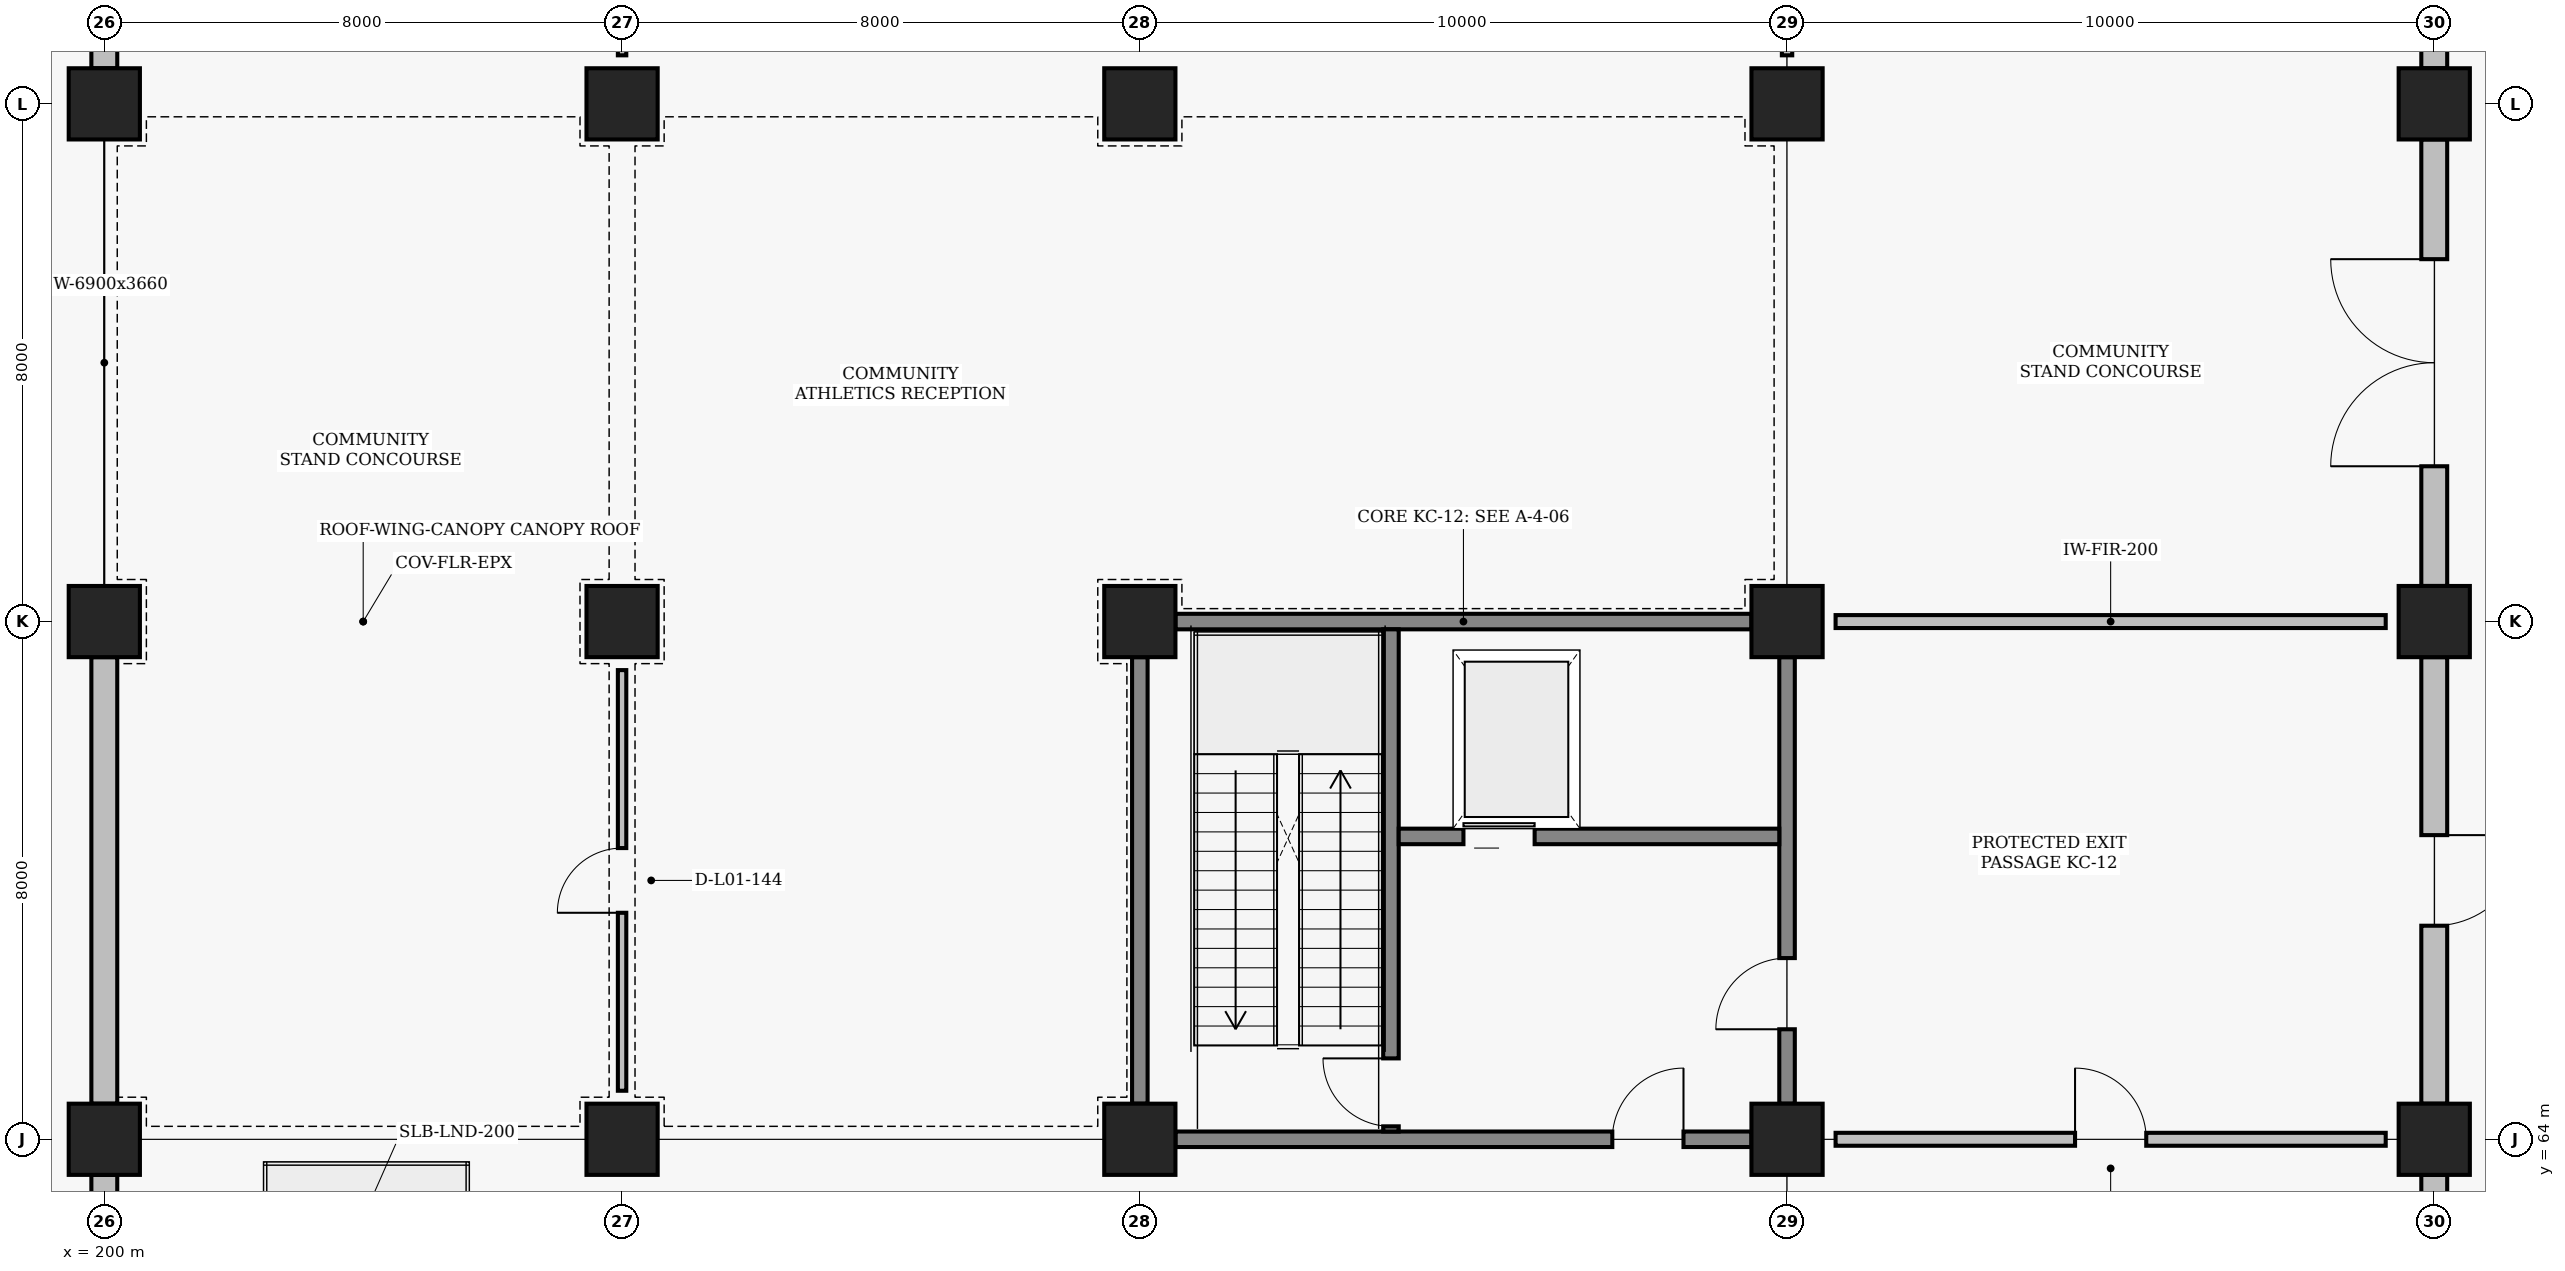
"""IFC4 building model, lengths in metres.
Left out: names, types, materials, properties, quantities, classifications, styles, units other than length and angle.
Written with IfcOpenShell. Run it as: python <this file> out.ifc"""

import sys

from ifc_helpers import new_model, si_unit, direction, frame, frame_2d, origin, origin_2d, place, context, subcontext, project, spatial, rectangle, extrude, element, fill, save


model = new_model("IFC4")
c1 = context("Model", 3, precision=1e-05, world=origin(), true_north=direction((0.0, 1.0)))
c2 = subcontext(c1, "Body", "Model", "MODEL_VIEW")
j1 = project(units=[si_unit("LENGTHUNIT", "METRE"), si_unit("PLANEANGLEUNIT", "RADIAN")], contexts=[c1])
p1 = place(None, origin())
s1 = spatial("IfcSite", under=j1, at=p1, CompositionType="ELEMENT")
p2 = place(p1, origin())
s2 = spatial("IfcBuilding", under=s1, at=p2, CompositionType="ELEMENT")
p3 = place(p2, origin())
s3 = spatial("IfcBuildingStorey", under=s2, at=p3, CompositionType="ELEMENT", Elevation=0.0)
for number, where, z_axis, x_axis in (
    (1, (200.0, 64.0, 0.0), (0.0, 0.0, 1.0), (1.0, 0.0, 0.0)),
    (2, (200.0, 72.0, 0.0), (0.0, 0.0, 1.0), (1.0, 0.0, 0.0)),
    (3, (200.0, 80.0, 0.0), (0.0, 0.0, 1.0), (1.0, 0.0, 0.0)),
    (4, (208.0, 64.0, 0.0), (0.0, 0.0, 1.0), (1.0, 0.0, 0.0)),
    (5, (208.0, 72.0, 0.0), (0.0, 0.0, 1.0), (1.0, 0.0, 0.0)),
    (6, (208.0, 80.0, 0.0), (0.0, 0.0, 1.0), (1.0, 0.0, 0.0)),
    (7, (216.0, 64.0, 0.0), (0.0, 0.0, 1.0), (1.0, 0.0, 0.0)),
    (8, (216.0, 72.0, 0.0), (0.0, 0.0, 1.0), (1.0, 0.0, 0.0)),
    (9, (216.0, 80.0, 0.0), (0.0, 0.0, 1.0), (1.0, 0.0, 0.0)),
    (10, (226.0, 64.0, 0.0), (0.0, 0.0, 1.0), (1.0, 0.0, 0.0)),
    (11, (226.0, 72.0, 0.0), (0.0, 0.0, 1.0), (1.0, 0.0, 0.0)),
    (12, (226.0, 80.0, 0.0), (0.0, 0.0, 1.0), (1.0, 0.0, 0.0)),
    (13, (236.0, 64.0, 0.0), (0.0, 0.0, 1.0), (1.0, 0.0, 0.0)),
    (14, (236.0, 72.0, 0.0), (0.0, 0.0, 1.0), (1.0, 0.0, 0.0)),
    (15, (236.0, 80.0, 0.0), (0.0, 0.0, 1.0), (1.0, 0.0, 0.0)),
):
    element("IfcColumn", number, at=place(p3, frame(where, z_axis=z_axis, x_axis=x_axis)), inside=s3, PredefinedType="COLUMN", context=c2, shape_type="SweptSolid", body=[
        extrude(rectangle(XDim=1.1, YDim=1.1, at=origin_2d()), origin(), (0.0, 0.0, 1.0), 4.8),
    ])
p4 = place(p3, frame((200.0, 56.55, 0.0), z_axis=(0.0, 0.0, 1.0), x_axis=(0.0, 1.0, 0.0)))
e16 = element("IfcWall", 16, at=p4, inside=s3, PredefinedType="SOLIDWALL", context=c2, shape_type="SweptSolid", body=[
    extrude(rectangle(XDim=6.9, YDim=0.4, at=frame_2d((3.45, 0.0))), origin(), (0.0, 0.0, 1.0), 3.91),
])
p5 = place(p4, frame((2.85, 0.0, 0.95)))
e17 = element("IfcOpeningElement", 17, at=p5, cuts=e16, PredefinedType="OPENING", context=c2, shape_type="SweptSolid", body=[
    extrude(rectangle(XDim=1.2, YDim=1.5, at=frame_2d((0.6, 0.75))), frame((0.0, 0.21, 0.0), z_axis=(0.0, -1.0, 0.0), x_axis=(1.0, 0.0, 0.0)), (0.0, 0.0, 1.0), 0.42),
])
p6 = place(p3, frame((200.0, 64.55, 0.0), z_axis=(0.0, 0.0, 1.0), x_axis=(0.0, 1.0, 0.0)))
e18 = element("IfcWall", 18, at=p6, inside=s3, PredefinedType="SOLIDWALL", context=c2, shape_type="SweptSolid", body=[
    extrude(rectangle(XDim=6.9, YDim=0.4, at=frame_2d((3.45, 0.0))), origin(), (0.0, 0.0, 1.0), 3.91),
])
p7 = place(p3, frame((200.0, 80.55, 0.0), z_axis=(0.0, 0.0, 1.0), x_axis=(0.0, 1.0, 0.0)))
e19 = element("IfcWall", 19, at=p7, inside=s3, PredefinedType="SOLIDWALL", context=c2, shape_type="SweptSolid", body=[
    extrude(rectangle(XDim=6.9, YDim=0.4, at=frame_2d((3.45, 0.0))), origin(), (0.0, 0.0, 1.0), 3.66),
])
p8 = place(p3, frame((236.0, 56.55, 0.0), z_axis=(0.0, 0.0, 1.0), x_axis=(0.0, 1.0, 0.0)))
e20 = element("IfcWall", 20, at=p8, inside=s3, PredefinedType="SOLIDWALL", context=c2, shape_type="SweptSolid", body=[
    extrude(rectangle(XDim=6.9, YDim=0.4, at=frame_2d((3.45, 0.0))), origin(), (0.0, 0.0, 1.0), 3.81),
])
p9 = place(p3, frame((236.0, 71.45, 0.0), z_axis=(0.0, 0.0, 1.0), x_axis=(0.0, -1.0, 0.0)))
e21 = element("IfcWall", 21, at=p9, inside=s3, PredefinedType="SOLIDWALL", context=c2, shape_type="SweptSolid", body=[
    extrude(rectangle(XDim=6.9, YDim=0.4, at=frame_2d((3.45, 0.0))), origin(), (0.0, 0.0, 1.0), 3.81),
])
p10 = place(p9, frame((2.75, 0.0, 0.0)))
e22 = element("IfcOpeningElement", 22, at=p10, cuts=e21, PredefinedType="OPENING", context=c2, shape_type="SweptSolid", body=[
    extrude(rectangle(XDim=1.4, YDim=2.2, at=frame_2d((0.7, 1.1))), frame((0.0, 0.21, 0.0), z_axis=(0.0, -1.0, 0.0), x_axis=(1.0, 0.0, 0.0)), (0.0, 0.0, 1.0), 0.42),
])
p11 = place(p3, frame((236.0, 72.55, 0.0), z_axis=(0.0, 0.0, 1.0), x_axis=(0.0, 1.0, 0.0)))
e23 = element("IfcWall", 23, at=p11, inside=s3, PredefinedType="SOLIDWALL", context=c2, shape_type="SweptSolid", body=[
    extrude(rectangle(XDim=6.9, YDim=0.4, at=frame_2d((3.45, 0.0))), origin(), (0.0, 0.0, 1.0), 3.81),
])
p12 = place(p11, frame((1.85, 0.0, 0.0)))
e24 = element("IfcOpeningElement", 24, at=p12, cuts=e23, PredefinedType="OPENING", context=c2, shape_type="SweptSolid", body=[
    extrude(rectangle(XDim=3.2, YDim=2.7, at=frame_2d((1.6, 1.35))), frame((0.0, 0.21, 0.0), z_axis=(0.0, -1.0, 0.0), x_axis=(1.0, 0.0, 0.0)), (0.0, 0.0, 1.0), 0.42),
])
p13 = place(p3, frame((236.0, 80.55, 0.0), z_axis=(0.0, 0.0, 1.0), x_axis=(0.0, 1.0, 0.0)))
e25 = element("IfcWall", 25, at=p13, inside=s3, PredefinedType="SOLIDWALL", context=c2, shape_type="SweptSolid", body=[
    extrude(rectangle(XDim=6.9, YDim=0.4, at=frame_2d((3.45, 0.0))), origin(), (0.0, 0.0, 1.0), 3.81),
])
p14 = place(p13, frame((2.05, 0.0, 0.0)))
e26 = element("IfcOpeningElement", 26, at=p14, cuts=e25, PredefinedType="OPENING", context=c2, shape_type="SweptSolid", body=[
    extrude(rectangle(XDim=2.8, YDim=2.55, at=frame_2d((1.4, 1.275))), frame((0.0, 0.21, 0.0), z_axis=(0.0, -1.0, 0.0), x_axis=(1.0, 0.0, 0.0)), (0.0, 0.0, 1.0), 0.42),
])
p15 = place(p3, frame((216.55, 64.0, 0.0), z_axis=(0.0, 0.0, 1.0), x_axis=(1.0, 0.0, 0.0)))
e27 = element("IfcWall", 27, at=p15, inside=s3, PredefinedType="SHEAR", context=c2, shape_type="SweptSolid", body=[
    extrude(rectangle(XDim=8.9, YDim=0.24, at=frame_2d((4.45, 0.0))), origin(), (0.0, 0.0, 1.0), 3.81),
])
p16 = place(p15, frame((6.75, 0.0, 0.0)))
e28 = element("IfcOpeningElement", 28, at=p16, cuts=e27, PredefinedType="OPENING", context=c2, shape_type="SweptSolid", body=[
    extrude(rectangle(XDim=1.1, YDim=2.2, at=frame_2d((0.55, 1.1))), frame((0.0, 0.13, 0.0), z_axis=(0.0, -1.0, 0.0), x_axis=(1.0, 0.0, 0.0)), (0.0, 0.0, 1.0), 0.26),
])
p17 = place(p3, frame((216.55, 72.0, 0.0), z_axis=(0.0, 0.0, 1.0), x_axis=(1.0, 0.0, 0.0)))
e29 = element("IfcWall", 29, at=p17, inside=s3, PredefinedType="SHEAR", context=c2, shape_type="SweptSolid", body=[
    extrude(rectangle(XDim=8.9, YDim=0.24, at=frame_2d((4.45, 0.0))), origin(), (0.0, 0.0, 1.0), 3.66),
])
p18 = place(p3, frame((216.0, 64.55, 0.0), z_axis=(0.0, 0.0, 1.0), x_axis=(0.0, 1.0, 0.0)))
e30 = element("IfcWall", 30, at=p18, inside=s3, PredefinedType="SHEAR", context=c2, shape_type="SweptSolid", body=[
    extrude(rectangle(XDim=6.9, YDim=0.24, at=frame_2d((3.45, 0.0))), origin(), (0.0, 0.0, 1.0), 3.66),
])
p19 = place(p3, frame((226.0, 64.55, 0.0), z_axis=(0.0, 0.0, 1.0), x_axis=(0.0, 1.0, 0.0)))
e31 = element("IfcWall", 31, at=p19, inside=s3, PredefinedType="SHEAR", context=c2, shape_type="SweptSolid", body=[
    extrude(rectangle(XDim=6.9, YDim=0.24, at=frame_2d((3.45, 0.0))), origin(), (0.0, 0.0, 1.0), 3.81),
])
p20 = place(p19, frame((1.15, 0.0, 0.0)))
e32 = element("IfcOpeningElement", 32, at=p20, cuts=e31, PredefinedType="OPENING", context=c2, shape_type="SweptSolid", body=[
    extrude(rectangle(XDim=1.1, YDim=2.2, at=frame_2d((0.55, 1.1))), frame((0.0, 0.13, 0.0), z_axis=(0.0, -1.0, 0.0), x_axis=(1.0, 0.0, 0.0)), (0.0, 0.0, 1.0), 0.26),
])
p21 = place(p3, frame((219.88, 64.12, 0.0), z_axis=(0.0, 0.0, 1.0), x_axis=(0.0, 1.0, 0.0)))
e33 = element("IfcWall", 33, at=p21, inside=s3, PredefinedType="SHEAR", context=c2, shape_type="SweptSolid", body=[
    extrude(rectangle(XDim=7.76, YDim=0.24, at=frame_2d((3.88, 0.0))), origin(), (0.0, 0.0, 1.0), 4.01),
])
p22 = place(p21, frame((0.08, 0.0, 0.0)))
e34 = element("IfcOpeningElement", 34, at=p22, cuts=e33, PredefinedType="OPENING", context=c2, shape_type="SweptSolid", body=[
    extrude(rectangle(XDim=1.05, YDim=2.15, at=frame_2d((0.525, 1.075))), frame((0.0, 0.13, 0.0), z_axis=(0.0, -1.0, 0.0), x_axis=(1.0, 0.0, 0.0)), (0.0, 0.0, 1.0), 0.26),
])
p23 = place(p3, frame((220.0, 68.68, 0.0), z_axis=(0.0, 0.0, 1.0), x_axis=(1.0, 0.0, 0.0)))
e35 = element("IfcWall", 35, at=p23, inside=s3, PredefinedType="SHEAR", context=c2, shape_type="SweptSolid", body=[
    extrude(rectangle(XDim=5.88, YDim=0.24, at=frame_2d((2.94, 0.0))), origin(), (0.0, 0.0, 1.0), 3.81),
])
p24 = place(p23, frame((1.0, 0.0, 0.0)))
e36 = element("IfcOpeningElement", 36, at=p24, cuts=e35, PredefinedType="OPENING", context=c2, shape_type="SweptSolid", body=[
    extrude(rectangle(XDim=1.1, YDim=2.15, at=frame_2d((0.55, 1.075))), frame((0.0, 0.13, 0.0), z_axis=(0.0, -1.0, 0.0), x_axis=(1.0, 0.0, 0.0)), (0.0, 0.0, 1.0), 0.26),
])
p25 = place(p3, frame((226.75, 64.0, 0.0), z_axis=(0.0, 0.0, 1.0), x_axis=(1.0, 0.0, 0.0)))
e37 = element("IfcWall", 37, at=p25, inside=s3, PredefinedType="PARTITIONING", context=c2, shape_type="SweptSolid", body=[
    extrude(rectangle(XDim=8.5, YDim=0.2, at=frame_2d((4.25, 0.0))), origin(), (0.0, 0.0, 1.0), 3.81),
])
p26 = place(p25, frame((3.7, 0.0, 0.0)))
e38 = element("IfcOpeningElement", 38, at=p26, cuts=e37, PredefinedType="OPENING", context=c2, shape_type="SweptSolid", body=[
    extrude(rectangle(XDim=1.1, YDim=2.2, at=frame_2d((0.55, 1.1))), frame((0.0, 0.11, 0.0), z_axis=(0.0, -1.0, 0.0), x_axis=(1.0, 0.0, 0.0)), (0.0, 0.0, 1.0), 0.22),
])
p27 = place(p3, frame((226.75, 72.0, 0.0), z_axis=(0.0, 0.0, 1.0), x_axis=(1.0, 0.0, 0.0)))
e39 = element("IfcWall", 39, at=p27, inside=s3, PredefinedType="PARTITIONING", context=c2, shape_type="SweptSolid", body=[
    extrude(rectangle(XDim=8.5, YDim=0.2, at=frame_2d((4.25, 0.0))), origin(), (0.0, 0.0, 1.0), 3.81),
])
p28 = place(p3, frame((208.0, 80.75, 0.0), z_axis=(0.0, 0.0, 1.0), x_axis=(0.0, 1.0, 0.0)))
e40 = element("IfcWall", 40, at=p28, inside=s3, PredefinedType="PARTITIONING", context=c2, shape_type="SweptSolid", body=[
    extrude(rectangle(XDim=6.5, YDim=0.13, at=frame_2d((3.25, 0.0))), origin(), (0.0, 0.0, 1.0), 3.81),
])
p29 = place(p28, frame((2.75, 0.0, 0.0)))
e41 = element("IfcOpeningElement", 41, at=p29, cuts=e40, PredefinedType="OPENING", context=c2, shape_type="SweptSolid", body=[
    extrude(rectangle(XDim=1.0, YDim=2.1, at=frame_2d((0.5, 1.05))), frame((0.0, 0.075, 0.0), z_axis=(0.0, -1.0, 0.0), x_axis=(1.0, 0.0, 0.0)), (0.0, 0.0, 1.0), 0.15),
])
p30 = place(p3, frame((208.0, 64.75, 0.0), z_axis=(0.0, 0.0, 1.0), x_axis=(0.0, 1.0, 0.0)))
e42 = element("IfcWall", 42, at=p30, inside=s3, PredefinedType="PARTITIONING", context=c2, shape_type="SweptSolid", body=[
    extrude(rectangle(XDim=6.5, YDim=0.13, at=frame_2d((3.25, 0.0))), origin(), (0.0, 0.0, 1.0), 3.81),
])
p31 = place(p30, frame((2.75, 0.0, 0.0)))
e43 = element("IfcOpeningElement", 43, at=p31, cuts=e42, PredefinedType="OPENING", context=c2, shape_type="SweptSolid", body=[
    extrude(rectangle(XDim=1.0, YDim=2.1, at=frame_2d((0.5, 1.05))), frame((0.0, 0.075, 0.0), z_axis=(0.0, -1.0, 0.0), x_axis=(1.0, 0.0, 0.0)), (0.0, 0.0, 1.0), 0.15),
])
p32 = place(p3, frame((226.0, 80.75, 0.0), z_axis=(0.0, 0.0, 1.0), x_axis=(0.0, 1.0, 0.0)))
e44 = element("IfcWall", 44, at=p32, inside=s3, PredefinedType="PARTITIONING", context=c2, shape_type="SweptSolid", body=[
    extrude(rectangle(XDim=6.5, YDim=0.16, at=frame_2d((3.25, 0.0))), origin(), (0.0, 0.0, 1.0), 3.81),
])
p33 = place(p32, frame((2.75, 0.0, 0.0)))
e45 = element("IfcOpeningElement", 45, at=p33, cuts=e44, PredefinedType="OPENING", context=c2, shape_type="SweptSolid", body=[
    extrude(rectangle(XDim=1.0, YDim=2.1, at=frame_2d((0.5, 1.05))), frame((0.0, 0.09, 0.0), z_axis=(0.0, -1.0, 0.0), x_axis=(1.0, 0.0, 0.0)), (0.0, 0.0, 1.0), 0.18),
])
p34 = place(p10, origin())
e46 = element("IfcDoor", 46, at=p34, inside=s3, OperationType="SINGLE_SWING_LEFT", PredefinedType="DOOR", context=c2, shape_type="SweptSolid", body=[
    extrude(rectangle(XDim=1.4, YDim=2.2, at=frame_2d((0.7, 1.1))), frame((0.0, 0.025, 0.0), z_axis=(0.0, -1.0, 0.0), x_axis=(1.0, 0.0, 0.0)), (0.0, 0.0, 1.0), 0.05),
])
fill(e22, e46)
p35 = place(p12, origin())
e47 = element("IfcDoor", 47, at=p35, inside=s3, OperationType="DOUBLE_SWING_LEFT", PredefinedType="DOOR", context=c2, shape_type="SweptSolid", body=[
    extrude(rectangle(XDim=3.2, YDim=2.7, at=frame_2d((1.6, 1.35))), frame((0.0, 0.025, 0.0), z_axis=(0.0, -1.0, 0.0), x_axis=(1.0, 0.0, 0.0)), (0.0, 0.0, 1.0), 0.05),
])
fill(e24, e47)
p36 = place(p16, origin())
e48 = element("IfcDoor", 48, at=p36, inside=s3, OperationType="SINGLE_SWING_RIGHT", PredefinedType="DOOR", context=c2, shape_type="SweptSolid", body=[
    extrude(rectangle(XDim=1.1, YDim=2.2, at=frame_2d((0.55, 1.1))), frame((0.0, 0.025, 0.0), z_axis=(0.0, -1.0, 0.0), x_axis=(1.0, 0.0, 0.0)), (0.0, 0.0, 1.0), 0.05),
])
fill(e28, e48)
p37 = place(p20, origin())
e49 = element("IfcDoor", 49, at=p37, inside=s3, OperationType="SINGLE_SWING_LEFT", PredefinedType="DOOR", context=c2, shape_type="SweptSolid", body=[
    extrude(rectangle(XDim=1.1, YDim=2.2, at=frame_2d((0.55, 1.1))), frame((0.0, 0.025, 0.0), z_axis=(0.0, -1.0, 0.0), x_axis=(1.0, 0.0, 0.0)), (0.0, 0.0, 1.0), 0.05),
])
fill(e32, e49)
p38 = place(p22, origin())
e50 = element("IfcDoor", 50, at=p38, inside=s3, OperationType="SINGLE_SWING_RIGHT", PredefinedType="DOOR", context=c2, shape_type="SweptSolid", body=[
    extrude(rectangle(XDim=1.05, YDim=2.15, at=frame_2d((0.525, 1.075))), frame((0.0, 0.025, 0.0), z_axis=(0.0, -1.0, 0.0), x_axis=(1.0, 0.0, 0.0)), (0.0, 0.0, 1.0), 0.05),
])
fill(e34, e50)
p39 = place(p24, origin())
e51 = element("IfcDoor", 51, at=p39, inside=s3, OperationType="SLIDING_TO_LEFT", PredefinedType="DOOR", context=c2, shape_type="SweptSolid", body=[
    extrude(rectangle(XDim=1.1, YDim=2.15, at=frame_2d((0.55, 1.075))), frame((0.0, 0.025, 0.0), z_axis=(0.0, -1.0, 0.0), x_axis=(1.0, 0.0, 0.0)), (0.0, 0.0, 1.0), 0.05),
])
fill(e36, e51)
p40 = place(p26, origin())
e52 = element("IfcDoor", 52, at=p40, inside=s3, OperationType="SINGLE_SWING_LEFT", PredefinedType="DOOR", context=c2, shape_type="SweptSolid", body=[
    extrude(rectangle(XDim=1.1, YDim=2.2, at=frame_2d((0.55, 1.1))), frame((0.0, 0.025, 0.0), z_axis=(0.0, -1.0, 0.0), x_axis=(1.0, 0.0, 0.0)), (0.0, 0.0, 1.0), 0.05),
])
fill(e38, e52)
p41 = place(p31, origin())
e53 = element("IfcDoor", 53, at=p41, inside=s3, OperationType="SINGLE_SWING_LEFT", PredefinedType="DOOR", context=c2, shape_type="SweptSolid", body=[
    extrude(rectangle(XDim=1.0, YDim=2.1, at=frame_2d((0.5, 1.05))), frame((0.0, 0.025, 0.0), z_axis=(0.0, -1.0, 0.0), x_axis=(1.0, 0.0, 0.0)), (0.0, 0.0, 1.0), 0.05),
])
fill(e43, e53)
save(model, sys.argv[1])
